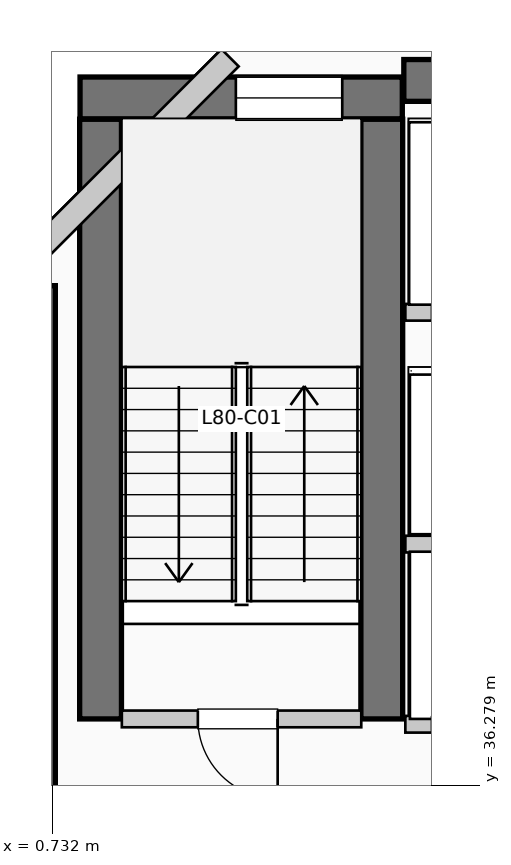
"""IFC4 building model, lengths in metres.
Left out: names, types, materials, properties, quantities, classifications, styles, units other than length and angle.
Written with IfcOpenShell. Run it as: python <this file> out.ifc"""

import sys

from ifc_helpers import new_model, si_unit, direction, frame, frame_2d, origin, place, context, subcontext, project, spatial, rectangle, extrude, element, fill, save


model = new_model("IFC4")
c1 = context("Model", 3, precision=1e-05, world=origin(), true_north=direction((0.0, 1.0)))
c2 = subcontext(c1, "Body", "Model", "MODEL_VIEW")
j1 = project(units=[si_unit("LENGTHUNIT", "METRE"), si_unit("PLANEANGLEUNIT", "RADIAN")], contexts=[c1])
p1 = place(None, origin())
s1 = spatial("IfcSite", under=j1, at=p1, CompositionType="ELEMENT")
p2 = place(p1, origin())
s2 = spatial("IfcBuilding", under=s1, at=p2, CompositionType="ELEMENT")
p3 = place(p2, frame((0.0, 0.0, 327.69)))
s3 = spatial("IfcBuildingStorey", under=s2, at=p3, CompositionType="ELEMENT", Elevation=327.69)
p4 = place(p3, frame((5.36, 45.55, 0.0), z_axis=(0.0, 0.0, 1.0), x_axis=(1.0, 0.0, 0.0)))
e1 = element("IfcWall", 1, at=p4, inside=s3, PredefinedType="SHEAR", context=c2, shape_type="SweptSolid", body=[
    extrude(rectangle(XDim=13.98, YDim=0.55, at=frame_2d((6.99, 0.0))), origin(), (0.0, 0.0, 1.0), 3.96),
])
p5 = place(p3, frame((0.5, 34.95, 0.0), z_axis=(0.0, 0.0, 1.0), x_axis=(0.0, 1.0, 0.0)))
e2 = element("IfcWall", 2, at=p5, inside=s3, PredefinedType="SHEAR", context=c2, shape_type="SweptSolid", body=[
    extrude(rectangle(XDim=7.9, YDim=0.55, at=frame_2d((3.95, 0.0))), origin(), (0.0, 0.0, 1.0), 3.96),
])
for number, where, z_axis, x_axis in (
    (3, (1.37, 37.15, 0.0), (0.0, 0.0, 1.0), (0.0, 1.0, 0.0)),
    (4, (5.07, 37.15, 0.0), (0.0, 0.0, 1.0), (0.0, 1.0, 0.0)),
):
    element("IfcWall", number, at=place(p3, frame(where, z_axis=z_axis, x_axis=x_axis)), inside=s3, PredefinedType="SHEAR", context=c2, shape_type="SweptSolid", body=[
        extrude(rectangle(XDim=7.89, YDim=0.55, at=frame_2d((3.945, 0.0))), origin(), (0.0, 0.0, 1.0), 3.96),
    ])
p6 = place(p3, frame((1.1, 45.32, 0.0), z_axis=(0.0, 0.0, 1.0), x_axis=(1.0, 0.0, 0.0)))
e5 = element("IfcWall", 5, at=p6, inside=s3, PredefinedType="SHEAR", context=c2, shape_type="SweptSolid", body=[
    extrude(rectangle(XDim=4.24, YDim=0.55, at=frame_2d((2.12, 0.0))), origin(), (0.0, 0.0, 1.0), 3.96),
])
p7 = place(p6, frame((2.05, 0.0, 1.05)))
e6 = element("IfcOpeningElement", 6, at=p7, cuts=e5, PredefinedType="OPENING", context=c2, shape_type="SweptSolid", body=[
    extrude(rectangle(XDim=1.4, YDim=1.8, at=frame_2d((0.7, 0.9))), frame((0.0, 0.285, 0.0), z_axis=(0.0, -1.0, 0.0), x_axis=(1.0, 0.0, 0.0)), (0.0, 0.0, 1.0), 0.57),
])
p8 = place(p3, frame((3.074, 45.848, 0.0), z_axis=(0.0, 0.0, 1.0), x_axis=(-0.707106781187, -0.707106781187, 0.0)))
e7 = element("IfcWall", 7, at=p8, inside=s3, PredefinedType="SOLIDWALL", context=c2, shape_type="SweptSolid", body=[
    extrude(rectangle(XDim=4.133, YDim=0.32, at=frame_2d((2.066, 0.0))), origin(), (0.0, 0.0, 1.0), 3.74),
])
p9 = place(p3, frame((1.65, 37.15, 0.0), z_axis=(0.0, 0.0, 1.0), x_axis=(1.0, 0.0, 0.0)))
e8 = element("IfcWall", 8, at=p9, inside=s3, PredefinedType="PARTITIONING", context=c2, shape_type="SweptSolid", body=[
    extrude(rectangle(XDim=3.15, YDim=0.22, at=frame_2d((1.575, 0.0))), origin(), (0.0, 0.0, 1.0), 3.74),
])
p10 = place(p9, frame((2.05, 0.0, 0.0), z_axis=(0.0, 0.0, 1.0), x_axis=(-1.0, 0.0, 0.0)))
e9 = element("IfcOpeningElement", 9, at=p10, cuts=e8, PredefinedType="OPENING", context=c2, shape_type="SweptSolid", body=[
    extrude(rectangle(XDim=1.05, YDim=2.15, at=frame_2d((0.525, 1.075))), frame((0.0, 0.12, 0.0), z_axis=(0.0, -1.0, 0.0), x_axis=(1.0, 0.0, 0.0)), (0.0, 0.0, 1.0), 0.24),
])
p11 = place(p3, frame((5.38, 37.08, 0.0), z_axis=(0.0, 0.0, 1.0), x_axis=(1.0, 0.0, 0.0)))
e10 = element("IfcWall", 10, at=p11, inside=s3, PredefinedType="PARTITIONING", context=c2, shape_type="SweptSolid", body=[
    extrude(rectangle(XDim=3.46, YDim=0.22, at=frame_2d((1.73, 0.0))), origin(), (0.0, 0.0, 1.0), 3.74),
])
p12 = place(p11, frame((1.55, 0.0, 0.0), z_axis=(0.0, 0.0, 1.0), x_axis=(-1.0, 0.0, 0.0)))
e11 = element("IfcOpeningElement", 11, at=p12, cuts=e10, PredefinedType="OPENING", context=c2, shape_type="SweptSolid", body=[
    extrude(rectangle(XDim=1.2, YDim=2.2, at=frame_2d((0.6, 1.1))), frame((0.0, 0.12, 0.0), z_axis=(0.0, -1.0, 0.0), x_axis=(1.0, 0.0, 0.0)), (0.0, 0.0, 1.0), 0.24),
])
p13 = place(p11, frame((3.22, 0.0, 0.0), z_axis=(0.0, 0.0, 1.0), x_axis=(-1.0, 0.0, 0.0)))
e12 = element("IfcOpeningElement", 12, at=p13, cuts=e10, PredefinedType="OPENING", context=c2, shape_type="SweptSolid", body=[
    extrude(rectangle(XDim=1.2, YDim=2.2, at=frame_2d((0.6, 1.1))), frame((0.0, 0.12, 0.0), z_axis=(0.0, -1.0, 0.0), x_axis=(1.0, 0.0, 0.0)), (0.0, 0.0, 1.0), 0.24),
])
p14 = place(p3, frame((5.38, 39.45, 0.0), z_axis=(0.0, 0.0, 1.0), x_axis=(1.0, 0.0, 0.0)))
e13 = element("IfcWall", 13, at=p14, inside=s3, PredefinedType="PARTITIONING", context=c2, shape_type="SweptSolid", body=[
    extrude(rectangle(XDim=3.46, YDim=0.22, at=frame_2d((1.73, 0.0))), origin(), (0.0, 0.0, 1.0), 3.74),
])
p15 = place(p3, frame((5.38, 42.5, 0.0), z_axis=(0.0, 0.0, 1.0), x_axis=(1.0, 0.0, 0.0)))
e14 = element("IfcWall", 14, at=p15, inside=s3, PredefinedType="PARTITIONING", context=c2, shape_type="SweptSolid", body=[
    extrude(rectangle(XDim=3.77, YDim=0.22, at=frame_2d((1.885, 0.0))), origin(), (0.0, 0.0, 1.0), 3.74),
])
p16 = place(p15, frame((1.75, 0.0, 0.0), z_axis=(0.0, 0.0, 1.0), x_axis=(-1.0, 0.0, 0.0)))
e15 = element("IfcOpeningElement", 15, at=p16, cuts=e14, PredefinedType="OPENING", context=c2, shape_type="SweptSolid", body=[
    extrude(rectangle(XDim=1.4, YDim=2.2, at=frame_2d((0.7, 1.1))), frame((0.0, 0.12, 0.0), z_axis=(0.0, -1.0, 0.0), x_axis=(1.0, 0.0, 0.0)), (0.0, 0.0, 1.0), 0.24),
])
p17 = place(p15, frame((3.53, 0.0, 0.0), z_axis=(0.0, 0.0, 1.0), x_axis=(-1.0, 0.0, 0.0)))
e16 = element("IfcOpeningElement", 16, at=p17, cuts=e14, PredefinedType="OPENING", context=c2, shape_type="SweptSolid", body=[
    extrude(rectangle(XDim=1.4, YDim=2.2, at=frame_2d((0.7, 1.1))), frame((0.0, 0.12, 0.0), z_axis=(0.0, -1.0, 0.0), x_axis=(1.0, 0.0, 0.0)), (0.0, 0.0, 1.0), 0.24),
])
p18 = place(p7, origin())
e17 = element("IfcWindow", 17, at=p18, inside=s3, PartitioningType="SINGLE_PANEL", PredefinedType="WINDOW", context=c2, shape_type="SweptSolid", body=[
    extrude(rectangle(XDim=1.4, YDim=1.8, at=frame_2d((0.7, 0.9))), frame((0.0, 0.03, 0.0), z_axis=(0.0, -1.0, 0.0), x_axis=(1.0, 0.0, 0.0)), (0.0, 0.0, 1.0), 0.06),
])
fill(e6, e17)
p19 = place(p10, origin())
e18 = element("IfcDoor", 18, at=p19, inside=s3, OperationType="SINGLE_SWING_RIGHT", PredefinedType="DOOR", context=c2, shape_type="SweptSolid", body=[
    extrude(rectangle(XDim=1.05, YDim=2.15, at=frame_2d((0.525, 1.075))), frame((0.0, 0.025, 0.0), z_axis=(0.0, -1.0, 0.0), x_axis=(1.0, 0.0, 0.0)), (0.0, 0.0, 1.0), 0.05),
])
fill(e9, e18)
save(model, sys.argv[1])
